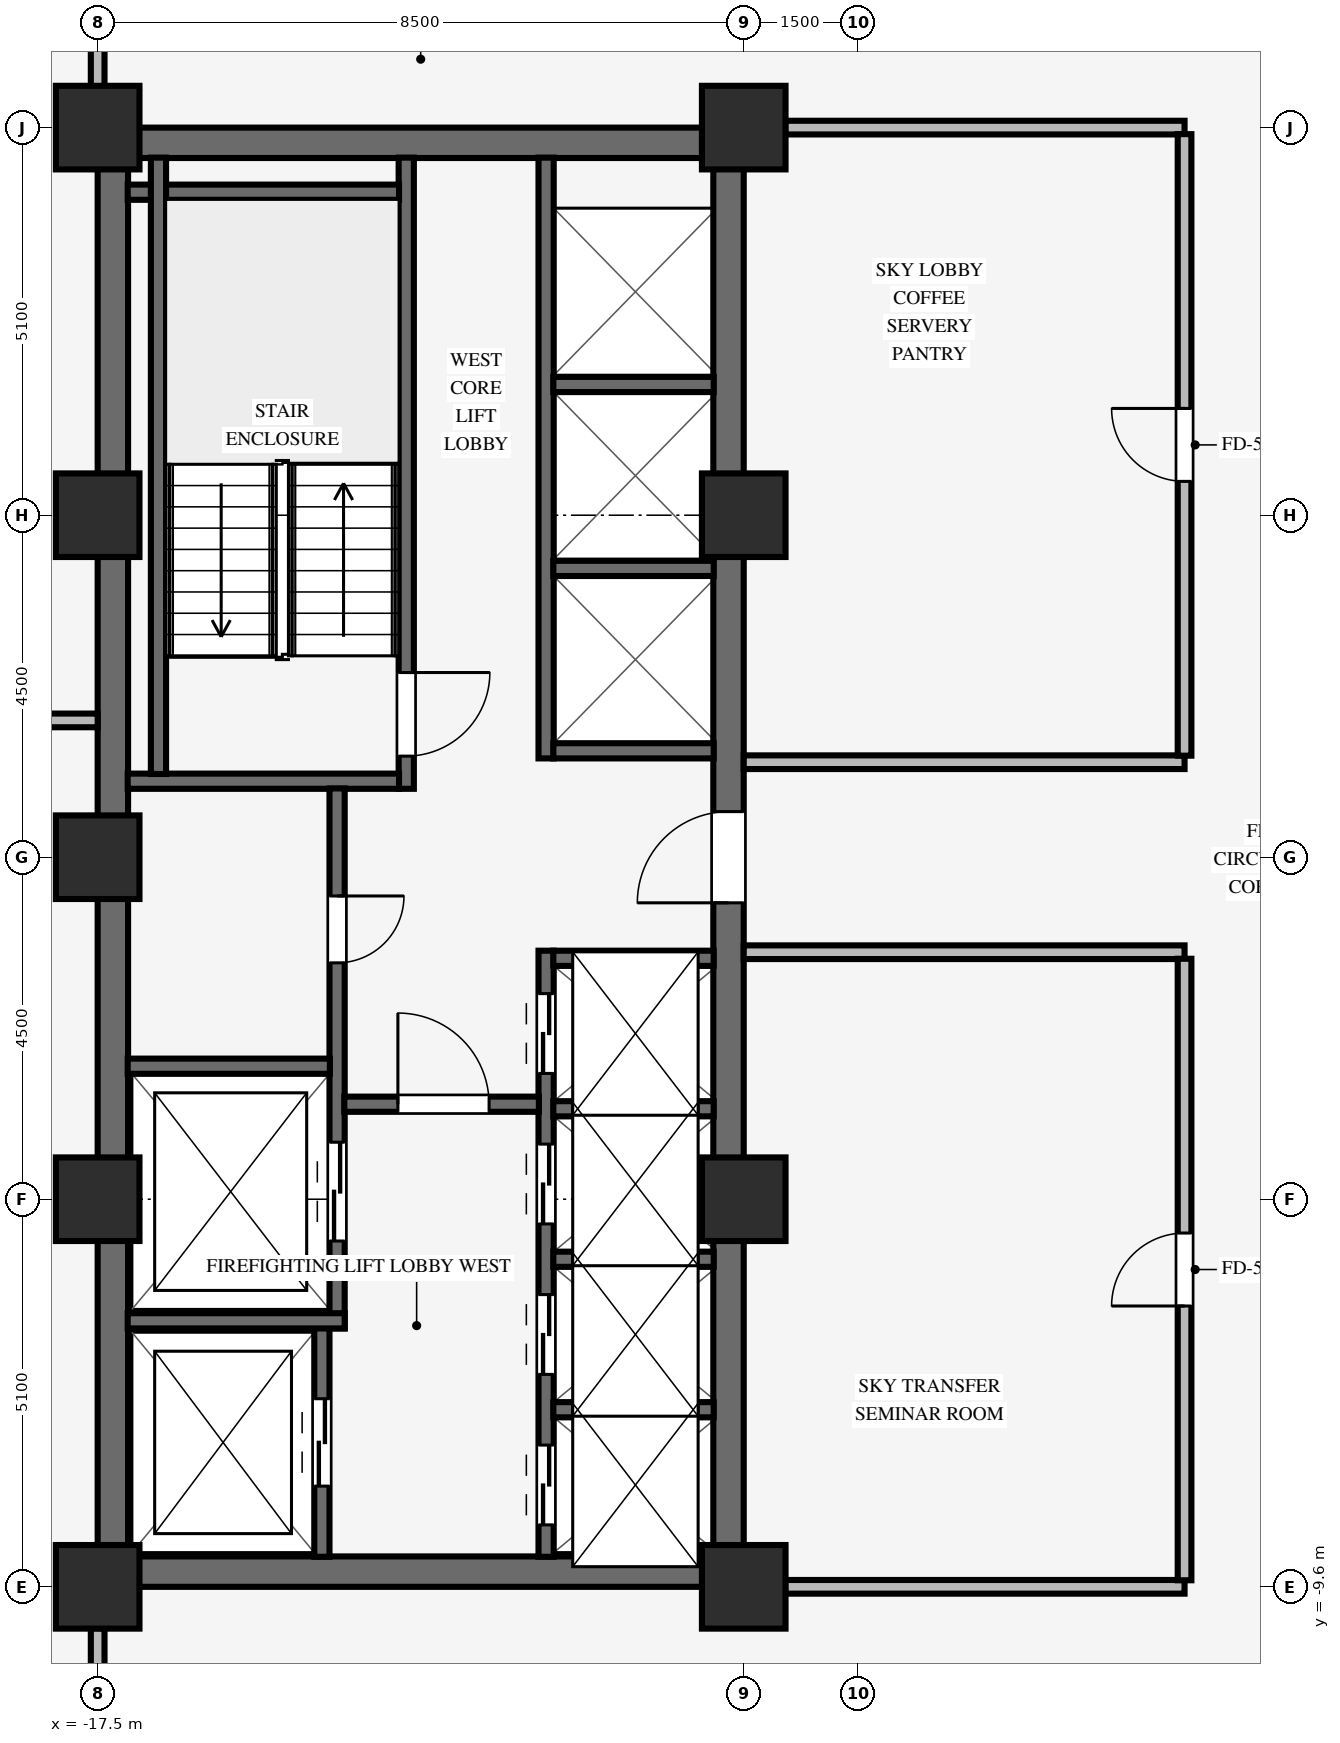
"""IFC4 building model, lengths in metres.
Left out: names, types, materials, properties, quantities, classifications, styles, units other than length and angle.
Written with IfcOpenShell. Run it as: python <this file> out.ifc"""

import sys

from ifc_helpers import new_model, si_unit, direction, frame, frame_2d, origin, origin_2d, place, context, subcontext, project, spatial, rectangle, extrude, source, transform, mapped, element, fill, save


model = new_model("IFC4")
c1 = context("Model", 3, precision=1e-05, world=origin(), true_north=direction((0.0, 1.0)))
c2 = subcontext(c1, "Body", "Model", "MODEL_VIEW")
j1 = project(units=[si_unit("LENGTHUNIT", "METRE"), si_unit("PLANEANGLEUNIT", "RADIAN")], contexts=[c1])
p1 = place(None, origin())
s1 = spatial("IfcSite", under=j1, at=p1, CompositionType="ELEMENT")
p2 = place(p1, origin())
s2 = spatial("IfcBuilding", under=s1, at=p2, CompositionType="ELEMENT")
p3 = place(p2, frame((0.0, 0.0, 120.2)))
s3 = spatial("IfcBuildingStorey", under=s2, at=p3, CompositionType="ELEMENT", Elevation=120.2)
for number, where, z_axis, x_axis in (
    (1, (-17.5, -9.4, 0.0), (0.0, 0.0, 1.0), (1.0, 0.0, 0.0)),
    (2, (-17.5, 9.4, 0.0), (0.0, 0.0, 1.0), (1.0, 0.0, 0.0)),
):
    element("IfcWall", number, at=place(p3, frame(where, z_axis=z_axis, x_axis=x_axis)), inside=s3, PredefinedType="SHEAR", context=c2, shape_type="SweptSolid", body=[
        extrude(rectangle(XDim=8.5, YDim=0.4, at=frame_2d((4.25, 0.0))), origin(), (0.0, 0.0, 1.0), 3.37),
    ])
p4 = place(p3, frame((-17.3, -9.205, 0.0), z_axis=(0.0, 0.0, 1.0), x_axis=(0.0, 1.0, 0.0)))
e3 = element("IfcWall", 3, at=p4, inside=s3, PredefinedType="SHEAR", context=c2, shape_type="SweptSolid", body=[
    extrude(rectangle(XDim=18.41, YDim=0.4, at=frame_2d((9.205, 0.0))), origin(), (0.0, 0.0, 1.0), 3.37),
])
p5 = place(p3, frame((-9.2, -9.205, 0.0), z_axis=(0.0, 0.0, 1.0), x_axis=(0.0, 1.0, 0.0)))
e4 = element("IfcWall", 4, at=p5, inside=s3, PredefinedType="SHEAR", context=c2, shape_type="SweptSolid", body=[
    extrude(rectangle(XDim=18.41, YDim=0.4, at=frame_2d((9.205, 0.0))), origin(), (0.0, 0.0, 1.0), 3.37),
])
p6 = place(p5, frame((8.605, 0.0, 0.0)))
e5 = element("IfcOpeningElement", 5, at=p6, cuts=e4, PredefinedType="OPENING", context=c2, shape_type="SweptSolid", body=[
    extrude(rectangle(XDim=1.2, YDim=2.15, at=frame_2d((0.6, 1.075))), frame((0.0, 0.21, 0.0), z_axis=(0.0, -1.0, 0.0), x_axis=(1.0, 0.0, 0.0)), (0.0, 0.0, 1.0), 0.42),
])
for number, where, z_axis, x_axis in (
    (6, (-17.5, -9.6, 0.0), (0.0, 0.0, 1.0), (1.0, 0.0, 0.0)),
    (7, (-17.5, -4.5, 0.0), (0.0, 0.0, 1.0), (1.0, 0.0, 0.0)),
    (8, (-17.5, 4.5, 0.0), (0.0, 0.0, 1.0), (1.0, 0.0, 0.0)),
    (9, (-17.5, 9.6, 0.0), (0.0, 0.0, 1.0), (1.0, 0.0, 0.0)),
    (10, (-9.0, -9.6, 0.0), (0.0, 0.0, 1.0), (1.0, 0.0, 0.0)),
    (11, (-9.0, -4.5, 0.0), (0.0, 0.0, 1.0), (1.0, 0.0, 0.0)),
    (12, (-9.0, 4.5, 0.0), (0.0, 0.0, 1.0), (1.0, 0.0, 0.0)),
    (13, (-9.0, 9.6, 0.0), (0.0, 0.0, 1.0), (1.0, 0.0, 0.0)),
    (14, (-17.5, 0.0, 0.0), (0.0, 0.0, 1.0), (1.0, 0.0, 0.0)),
):
    element("IfcColumn", number, at=place(p3, frame(where, z_axis=z_axis, x_axis=x_axis)), inside=s3, PredefinedType="COLUMN", context=c2, shape_type="SweptSolid", body=[
        extrude(rectangle(XDim=1.1, YDim=1.1, at=origin_2d()), origin(), (0.0, 0.0, 1.0), 3.37),
    ])
p7 = place(p3, frame((-13.44, 0.9, 0.0), z_axis=(0.0, 0.0, 1.0), x_axis=(0.0, 1.0, 0.0)))
e15 = element("IfcWall", 15, at=p7, inside=s3, PredefinedType="SHEAR", context=c2, shape_type="SweptSolid", body=[
    extrude(rectangle(XDim=8.305, YDim=0.2, at=frame_2d((4.153, 0.0))), origin(), (0.0, 0.0, 1.0), 3.37),
])
p8 = place(p7, frame((1.53, 0.0, 0.0), z_axis=(0.0, 0.0, 1.0), x_axis=(-1.0, 0.0, 0.0)))
e16 = element("IfcOpeningElement", 16, at=p8, cuts=e15, PredefinedType="OPENING", context=c2, shape_type="SweptSolid", body=[
    extrude(rectangle(XDim=1.1, YDim=2.15, at=frame_2d((0.55, 1.075))), frame((0.0, 0.11, 0.0), z_axis=(0.0, -1.0, 0.0), x_axis=(1.0, 0.0, 0.0)), (0.0, 0.0, 1.0), 0.22),
])
for number, where, z_axis, x_axis in (
    (17, (-17.105, 1.0, 0.0), (0.0, 0.0, 1.0), (1.0, 0.0, 0.0)),
    (18, (-17.105, 8.75, 0.0), (0.0, 0.0, 1.0), (1.0, 0.0, 0.0)),
):
    element("IfcWall", number, at=place(p3, frame(where, z_axis=z_axis, x_axis=x_axis)), inside=s3, PredefinedType="SHEAR", context=c2, shape_type="SweptSolid", body=[
        extrude(rectangle(XDim=3.57, YDim=0.2, at=frame_2d((1.785, 0.0))), origin(), (0.0, 0.0, 1.0), 3.37),
    ])
p9 = place(p3, frame((-16.7, 1.095, 0.0), z_axis=(0.0, 0.0, 1.0), x_axis=(0.0, 1.0, 0.0)))
e19 = element("IfcWall", 19, at=p9, inside=s3, PredefinedType="SHEAR", context=c2, shape_type="SweptSolid", body=[
    extrude(rectangle(XDim=8.11, YDim=0.2, at=frame_2d((4.055, 0.0))), origin(), (0.0, 0.0, 1.0), 3.37),
])
p10 = place(p3, frame((-14.55, -9.205, 0.0), z_axis=(0.0, 0.0, 1.0), x_axis=(0.0, 1.0, 0.0)))
e20 = element("IfcWall", 20, at=p10, inside=s3, PredefinedType="SHEAR", context=c2, shape_type="SweptSolid", body=[
    extrude(rectangle(XDim=3.01, YDim=0.2, at=frame_2d((1.505, 0.0))), origin(), (0.0, 0.0, 1.0), 3.37),
])
p11 = place(p10, frame((0.93, 0.0, 0.0)))
e21 = element("IfcOpeningElement", 21, at=p11, cuts=e20, PredefinedType="OPENING", context=c2, shape_type="SweptSolid", body=[
    extrude(rectangle(XDim=1.15, YDim=2.15, at=frame_2d((0.575, 1.075))), frame((0.0, 0.11, 0.0), z_axis=(0.0, -1.0, 0.0), x_axis=(1.0, 0.0, 0.0)), (0.0, 0.0, 1.0), 0.22),
])
p12 = place(p3, frame((-14.35, -6.2, 0.0), z_axis=(0.0, 0.0, 1.0), x_axis=(0.0, 1.0, 0.0)))
e22 = element("IfcWall", 22, at=p12, inside=s3, PredefinedType="SHEAR", context=c2, shape_type="SweptSolid", body=[
    extrude(rectangle(XDim=7.105, YDim=0.2, at=frame_2d((3.552, 0.0))), origin(), (0.0, 0.0, 1.0), 3.37),
])
p13 = place(p12, frame((5.69, 0.0, 0.0), z_axis=(0.0, 0.0, 1.0), x_axis=(-1.0, 0.0, 0.0)))
e23 = element("IfcOpeningElement", 23, at=p13, cuts=e22, PredefinedType="OPENING", context=c2, shape_type="SweptSolid", body=[
    extrude(rectangle(XDim=0.88, YDim=2.1, at=frame_2d((0.44, 1.05))), frame((0.0, 0.11, 0.0), z_axis=(0.0, -1.0, 0.0), x_axis=(1.0, 0.0, 0.0)), (0.0, 0.0, 1.0), 0.22),
])
p14 = place(p12, frame((1.15, 0.0, 0.0)))
e24 = element("IfcOpeningElement", 24, at=p14, cuts=e22, PredefinedType="OPENING", context=c2, shape_type="SweptSolid", body=[
    extrude(rectangle(XDim=1.3, YDim=2.2, at=frame_2d((0.65, 1.1))), frame((0.0, 0.11, 0.0), z_axis=(0.0, -1.0, 0.0), x_axis=(1.0, 0.0, 0.0)), (0.0, 0.0, 1.0), 0.22),
])
p15 = place(p3, frame((-17.105, -6.1, 0.0), z_axis=(0.0, 0.0, 1.0), x_axis=(1.0, 0.0, 0.0)))
e25 = element("IfcWall", 25, at=p15, inside=s3, PredefinedType="SHEAR", context=c2, shape_type="SweptSolid", body=[
    extrude(rectangle(XDim=2.855, YDim=0.2, at=frame_2d((1.427, 0.0))), origin(), (0.0, 0.0, 1.0), 3.37),
])
p16 = place(p3, frame((-17.105, -2.75, 0.0), z_axis=(0.0, 0.0, 1.0), x_axis=(1.0, 0.0, 0.0)))
e26 = element("IfcWall", 26, at=p16, inside=s3, PredefinedType="SHEAR", context=c2, shape_type="SweptSolid", body=[
    extrude(rectangle(XDim=2.66, YDim=0.2, at=frame_2d((1.33, 0.0))), origin(), (0.0, 0.0, 1.0), 3.37),
])
p17 = place(p3, frame((-11.6, -9.205, 0.0), z_axis=(0.0, 0.0, 1.0), x_axis=(0.0, 1.0, 0.0)))
e27 = element("IfcWall", 27, at=p17, inside=s3, PredefinedType="SHEAR", context=c2, shape_type="SweptSolid", body=[
    extrude(rectangle(XDim=7.975, YDim=0.2, at=frame_2d((3.988, 0.0))), origin(), (0.0, 0.0, 1.0), 3.37),
])
p18 = place(p17, frame((0.42, 0.0, 0.0)))
e28 = element("IfcOpeningElement", 28, at=p18, cuts=e27, PredefinedType="OPENING", context=c2, shape_type="SweptSolid", body=[
    extrude(rectangle(XDim=1.05, YDim=2.15, at=frame_2d((0.525, 1.075))), frame((0.0, 0.11, 0.0), z_axis=(0.0, -1.0, 0.0), x_axis=(1.0, 0.0, 0.0)), (0.0, 0.0, 1.0), 0.22),
])
p19 = place(p17, frame((2.4, 0.0, 0.0)))
e29 = element("IfcOpeningElement", 29, at=p19, cuts=e27, PredefinedType="OPENING", context=c2, shape_type="SweptSolid", body=[
    extrude(rectangle(XDim=1.05, YDim=2.15, at=frame_2d((0.525, 1.075))), frame((0.0, 0.11, 0.0), z_axis=(0.0, -1.0, 0.0), x_axis=(1.0, 0.0, 0.0)), (0.0, 0.0, 1.0), 0.22),
])
p20 = place(p17, frame((4.38, 0.0, 0.0)))
e30 = element("IfcOpeningElement", 30, at=p20, cuts=e27, PredefinedType="OPENING", context=c2, shape_type="SweptSolid", body=[
    extrude(rectangle(XDim=1.05, YDim=2.15, at=frame_2d((0.525, 1.075))), frame((0.0, 0.11, 0.0), z_axis=(0.0, -1.0, 0.0), x_axis=(1.0, 0.0, 0.0)), (0.0, 0.0, 1.0), 0.22),
])
p21 = place(p17, frame((6.36, 0.0, 0.0)))
e31 = element("IfcOpeningElement", 31, at=p21, cuts=e27, PredefinedType="OPENING", context=c2, shape_type="SweptSolid", body=[
    extrude(rectangle(XDim=1.05, YDim=2.15, at=frame_2d((0.525, 1.075))), frame((0.0, 0.11, 0.0), z_axis=(0.0, -1.0, 0.0), x_axis=(1.0, 0.0, 0.0)), (0.0, 0.0, 1.0), 0.22),
])
p22 = place(p3, frame((-14.255, -3.25, 0.0), z_axis=(0.0, 0.0, 1.0), x_axis=(1.0, 0.0, 0.0)))
e32 = element("IfcWall", 32, at=p22, inside=s3, PredefinedType="SHEAR", context=c2, shape_type="SweptSolid", body=[
    extrude(rectangle(XDim=2.56, YDim=0.2, at=frame_2d((1.28, 0.0))), origin(), (0.0, 0.0, 1.0), 3.37),
])
p23 = place(p22, frame((0.705, 0.0, 0.0)))
e33 = element("IfcOpeningElement", 33, at=p23, cuts=e32, PredefinedType="OPENING", context=c2, shape_type="SweptSolid", body=[
    extrude(rectangle(XDim=1.2, YDim=2.15, at=frame_2d((0.6, 1.075))), frame((0.0, 0.11, 0.0), z_axis=(0.0, -1.0, 0.0), x_axis=(1.0, 0.0, 0.0)), (0.0, 0.0, 1.0), 0.22),
])
for number, where, z_axis, x_axis in (
    (34, (-11.505, -7.27, 0.0), (0.0, 0.0, 1.0), (1.0, 0.0, 0.0)),
    (35, (-11.505, -5.29, 0.0), (0.0, 0.0, 1.0), (1.0, 0.0, 0.0)),
    (36, (-11.505, -3.31, 0.0), (0.0, 0.0, 1.0), (1.0, 0.0, 0.0)),
    (37, (-11.505, -1.33, 0.0), (0.0, 0.0, 1.0), (1.0, 0.0, 0.0)),
):
    element("IfcWall", number, at=place(p3, frame(where, z_axis=z_axis, x_axis=x_axis)), inside=s3, PredefinedType="SHEAR", context=c2, shape_type="SweptSolid", body=[
        extrude(rectangle(XDim=2.11, YDim=0.2, at=frame_2d((1.055, 0.0))), origin(), (0.0, 0.0, 1.0), 3.37),
    ])
p24 = place(p3, frame((-11.6, 1.3, 0.0), z_axis=(0.0, 0.0, 1.0), x_axis=(0.0, 1.0, 0.0)))
e38 = element("IfcWall", 38, at=p24, inside=s3, PredefinedType="SHEAR", context=c2, shape_type="SweptSolid", body=[
    extrude(rectangle(XDim=7.905, YDim=0.2, at=frame_2d((3.953, 0.0))), origin(), (0.0, 0.0, 1.0), 3.37),
])
for number, where, z_axis, x_axis in (
    (39, (-11.505, 1.4, 0.0), (0.0, 0.0, 1.0), (1.0, 0.0, 0.0)),
    (40, (-11.505, 3.8, 0.0), (0.0, 0.0, 1.0), (1.0, 0.0, 0.0)),
    (41, (-11.505, 6.22, 0.0), (0.0, 0.0, 1.0), (1.0, 0.0, 0.0)),
):
    element("IfcWall", number, at=place(p3, frame(where, z_axis=z_axis, x_axis=x_axis)), inside=s3, PredefinedType="SHEAR", context=c2, shape_type="SweptSolid", body=[
        extrude(rectangle(XDim=2.11, YDim=0.2, at=frame_2d((1.055, 0.0))), origin(), (0.0, 0.0, 1.0), 3.37),
    ])
p25 = place(p3, frame((-8.454, -9.6, 0.0), z_axis=(0.0, 0.0, 1.0), x_axis=(1.0, 0.0, 0.0)))
e42 = element("IfcWall", 42, at=p25, inside=s3, PredefinedType="PARTITIONING", context=c2, shape_type="SweptSolid", body=[
    extrude(rectangle(XDim=5.254, YDim=0.18, at=frame_2d((2.627, 0.0))), origin(), (0.0, 0.0, 1.0), 2.405),
])
for number, where, z_axis, x_axis in (
    (43, (-9.0, -1.25, 0.0), (0.0, 0.0, 1.0), (1.0, 0.0, 0.0)),
    (44, (-9.0, 1.25, 0.0), (0.0, 0.0, 1.0), (1.0, 0.0, 0.0)),
):
    element("IfcWall", number, at=place(p3, frame(where, z_axis=z_axis, x_axis=x_axis)), inside=s3, PredefinedType="PARTITIONING", context=c2, shape_type="SweptSolid", body=[
        extrude(rectangle(XDim=5.8, YDim=0.18, at=frame_2d((2.9, 0.0))), origin(), (0.0, 0.0, 1.0), 3.36),
    ])
p26 = place(p3, frame((-26.225, 1.8, 0.0), z_axis=(0.0, 0.0, 1.0), x_axis=(1.0, 0.0, 0.0)))
e45 = element("IfcWall", 45, at=p26, inside=s3, PredefinedType="PARTITIONING", context=c2, shape_type="SweptSolid", body=[
    extrude(rectangle(XDim=8.725, YDim=0.18, at=frame_2d((4.363, 0.0))), origin(), (0.0, 0.0, 1.0), 3.36),
])
p27 = place(p3, frame((-8.454, 9.6, 0.0), z_axis=(0.0, 0.0, 1.0), x_axis=(1.0, 0.0, 0.0)))
e46 = element("IfcWall", 46, at=p27, inside=s3, PredefinedType="PARTITIONING", context=c2, shape_type="SweptSolid", body=[
    extrude(rectangle(XDim=5.254, YDim=0.18, at=frame_2d((2.627, 0.0))), origin(), (0.0, 0.0, 1.0), 2.405),
])
for number, where, z_axis, x_axis in (
    (47, (-17.5, -11.114, 0.0), (0.0, 0.0, 1.0), (0.0, 1.0, 0.0)),
    (48, (-17.5, 10.146, 0.0), (0.0, 0.0, 1.0), (0.0, 1.0, 0.0)),
):
    element("IfcWall", number, at=place(p3, frame(where, z_axis=z_axis, x_axis=x_axis)), inside=s3, PredefinedType="PARTITIONING", context=c2, shape_type="SweptSolid", body=[
        extrude(rectangle(XDim=0.968, YDim=0.18, at=frame_2d((0.484, 0.0))), origin(), (0.0, 0.0, 1.0), 2.816),
    ])
p28 = place(p3, frame((-3.2, -9.514, 0.0), z_axis=(0.0, 0.0, 1.0), x_axis=(0.0, 1.0, 0.0)))
e49 = element("IfcWall", 49, at=p28, inside=s3, PredefinedType="PARTITIONING", context=c2, shape_type="SweptSolid", body=[
    extrude(rectangle(XDim=8.178, YDim=0.18, at=frame_2d((4.089, 0.0))), origin(), (0.0, 0.0, 1.0), 3.36),
])
p29 = place(p28, frame((3.609, 0.0, 0.0)))
e50 = element("IfcOpeningElement", 50, at=p29, cuts=e49, PredefinedType="OPENING", context=c2, shape_type="SweptSolid", body=[
    extrude(rectangle(XDim=0.96, YDim=2.1, at=frame_2d((0.48, 1.05))), frame((0.0, 0.1, 0.0), z_axis=(0.0, -1.0, 0.0), x_axis=(1.0, 0.0, 0.0)), (0.0, 0.0, 1.0), 0.2),
])
p30 = place(p3, frame((-3.2, 1.336, 0.0), z_axis=(0.0, 0.0, 1.0), x_axis=(0.0, 1.0, 0.0)))
e51 = element("IfcWall", 51, at=p30, inside=s3, PredefinedType="PARTITIONING", context=c2, shape_type="SweptSolid", body=[
    extrude(rectangle(XDim=8.178, YDim=0.18, at=frame_2d((4.089, 0.0))), origin(), (0.0, 0.0, 1.0), 3.36),
])
p31 = place(p30, frame((3.609, 0.0, 0.0)))
e52 = element("IfcOpeningElement", 52, at=p31, cuts=e51, PredefinedType="OPENING", context=c2, shape_type="SweptSolid", body=[
    extrude(rectangle(XDim=0.96, YDim=2.1, at=frame_2d((0.48, 1.05))), frame((0.0, 0.1, 0.0), z_axis=(0.0, -1.0, 0.0), x_axis=(1.0, 0.0, 0.0)), (0.0, 0.0, 1.0), 0.2),
])
m1 = source(origin(), c2, "Body", "SweptSolid", [
    extrude(rectangle(XDim=1.1, YDim=2.15, at=frame_2d((0.55, 1.075))), frame((0.0, 0.025, 0.0), z_axis=(0.0, -1.0, 0.0), x_axis=(1.0, 0.0, 0.0)), (0.0, 0.0, 1.0), 0.05),
])
p32 = place(p8, origin())
e53 = element("IfcDoor", 53, at=p32, inside=s3, OperationType="SINGLE_SWING_LEFT", PredefinedType="DOOR", context=c2, shape_type="MappedRepresentation", body=[
    mapped(m1, transform((0.0, 0.0, 0.0), scale=1.0)),
])
fill(e16, e53)
m2 = source(origin(), c2, "Body", "SweptSolid", [
    extrude(rectangle(XDim=0.88, YDim=2.1, at=frame_2d((0.44, 1.05))), frame((0.0, 0.025, 0.0), z_axis=(0.0, -1.0, 0.0), x_axis=(1.0, 0.0, 0.0)), (0.0, 0.0, 1.0), 0.05),
])
p33 = place(p13, origin())
e54 = element("IfcDoor", 54, at=p33, inside=s3, OperationType="SINGLE_SWING_LEFT", PredefinedType="DOOR", context=c2, shape_type="MappedRepresentation", body=[
    mapped(m2, transform((0.0, 0.0, 0.0), scale=1.0)),
])
fill(e23, e54)
m3 = source(origin(), c2, "Body", "SweptSolid", [
    extrude(rectangle(XDim=1.2, YDim=2.15, at=frame_2d((0.6, 1.075))), frame((0.0, 0.025, 0.0), z_axis=(0.0, -1.0, 0.0), x_axis=(1.0, 0.0, 0.0)), (0.0, 0.0, 1.0), 0.05),
])
p34 = place(p23, origin())
e55 = element("IfcDoor", 55, at=p34, inside=s3, OperationType="SINGLE_SWING_LEFT", PredefinedType="DOOR", context=c2, shape_type="MappedRepresentation", body=[
    mapped(m3, transform((0.0, 0.0, 0.0), scale=1.0)),
])
fill(e33, e55)
p35 = place(p6, origin())
e56 = element("IfcDoor", 56, at=p35, inside=s3, OperationType="SINGLE_SWING_LEFT", PredefinedType="DOOR", context=c2, shape_type="MappedRepresentation", body=[
    mapped(m3, transform((0.0, 0.0, 0.0), scale=1.0)),
])
fill(e5, e56)
m4 = source(origin(), c2, "Body", "SweptSolid", [
    extrude(rectangle(XDim=1.15, YDim=2.15, at=frame_2d((0.575, 1.075))), frame((0.0, 0.025, 0.0), z_axis=(0.0, -1.0, 0.0), x_axis=(1.0, 0.0, 0.0)), (0.0, 0.0, 1.0), 0.05),
])
p36 = place(p11, origin())
e57 = element("IfcDoor", 57, at=p36, inside=s3, OperationType="DOUBLE_DOOR_SLIDING", PredefinedType="DOOR", context=c2, shape_type="MappedRepresentation", body=[
    mapped(m4, transform((0.0, 0.0, 0.0), scale=1.0)),
])
fill(e21, e57)
m5 = source(origin(), c2, "Body", "SweptSolid", [
    extrude(rectangle(XDim=1.3, YDim=2.2, at=frame_2d((0.65, 1.1))), frame((0.0, 0.025, 0.0), z_axis=(0.0, -1.0, 0.0), x_axis=(1.0, 0.0, 0.0)), (0.0, 0.0, 1.0), 0.05),
])
p37 = place(p14, origin())
e58 = element("IfcDoor", 58, at=p37, inside=s3, OperationType="DOUBLE_DOOR_SLIDING", PredefinedType="DOOR", context=c2, shape_type="MappedRepresentation", body=[
    mapped(m5, transform((0.0, 0.0, 0.0), scale=1.0)),
])
fill(e24, e58)
m6 = source(origin(), c2, "Body", "SweptSolid", [
    extrude(rectangle(XDim=1.05, YDim=2.15, at=frame_2d((0.525, 1.075))), frame((0.0, 0.025, 0.0), z_axis=(0.0, -1.0, 0.0), x_axis=(1.0, 0.0, 0.0)), (0.0, 0.0, 1.0), 0.05),
])
p38 = place(p18, origin())
e59 = element("IfcDoor", 59, at=p38, inside=s3, OperationType="DOUBLE_DOOR_SLIDING", PredefinedType="DOOR", context=c2, shape_type="MappedRepresentation", body=[
    mapped(m6, transform((0.0, 0.0, 0.0), scale=1.0)),
])
fill(e28, e59)
p39 = place(p19, origin())
e60 = element("IfcDoor", 60, at=p39, inside=s3, OperationType="DOUBLE_DOOR_SLIDING", PredefinedType="DOOR", context=c2, shape_type="MappedRepresentation", body=[
    mapped(m6, transform((0.0, 0.0, 0.0), scale=1.0)),
])
fill(e29, e60)
p40 = place(p20, origin())
e61 = element("IfcDoor", 61, at=p40, inside=s3, OperationType="DOUBLE_DOOR_SLIDING", PredefinedType="DOOR", context=c2, shape_type="MappedRepresentation", body=[
    mapped(m6, transform((0.0, 0.0, 0.0), scale=1.0)),
])
fill(e30, e61)
p41 = place(p21, origin())
e62 = element("IfcDoor", 62, at=p41, inside=s3, OperationType="DOUBLE_DOOR_SLIDING", PredefinedType="DOOR", context=c2, shape_type="MappedRepresentation", body=[
    mapped(m6, transform((0.0, 0.0, 0.0), scale=1.0)),
])
fill(e31, e62)
m7 = source(origin(), c2, "Body", "SweptSolid", [
    extrude(rectangle(XDim=0.96, YDim=2.1, at=frame_2d((0.48, 1.05))), frame((0.0, 0.025, 0.0), z_axis=(0.0, -1.0, 0.0), x_axis=(1.0, 0.0, 0.0)), (0.0, 0.0, 1.0), 0.05),
])
p42 = place(p31, origin())
e63 = element("IfcDoor", 63, at=p42, inside=s3, OperationType="SINGLE_SWING_RIGHT", PredefinedType="DOOR", context=c2, shape_type="MappedRepresentation", body=[
    mapped(m7, transform((0.0, 0.0, 0.0), scale=1.0)),
])
fill(e52, e63)
p43 = place(p29, origin())
e64 = element("IfcDoor", 64, at=p43, inside=s3, OperationType="SINGLE_SWING_LEFT", PredefinedType="DOOR", context=c2, shape_type="MappedRepresentation", body=[
    mapped(m7, transform((0.0, 0.0, 0.0), scale=1.0)),
])
fill(e50, e64)
save(model, sys.argv[1])
